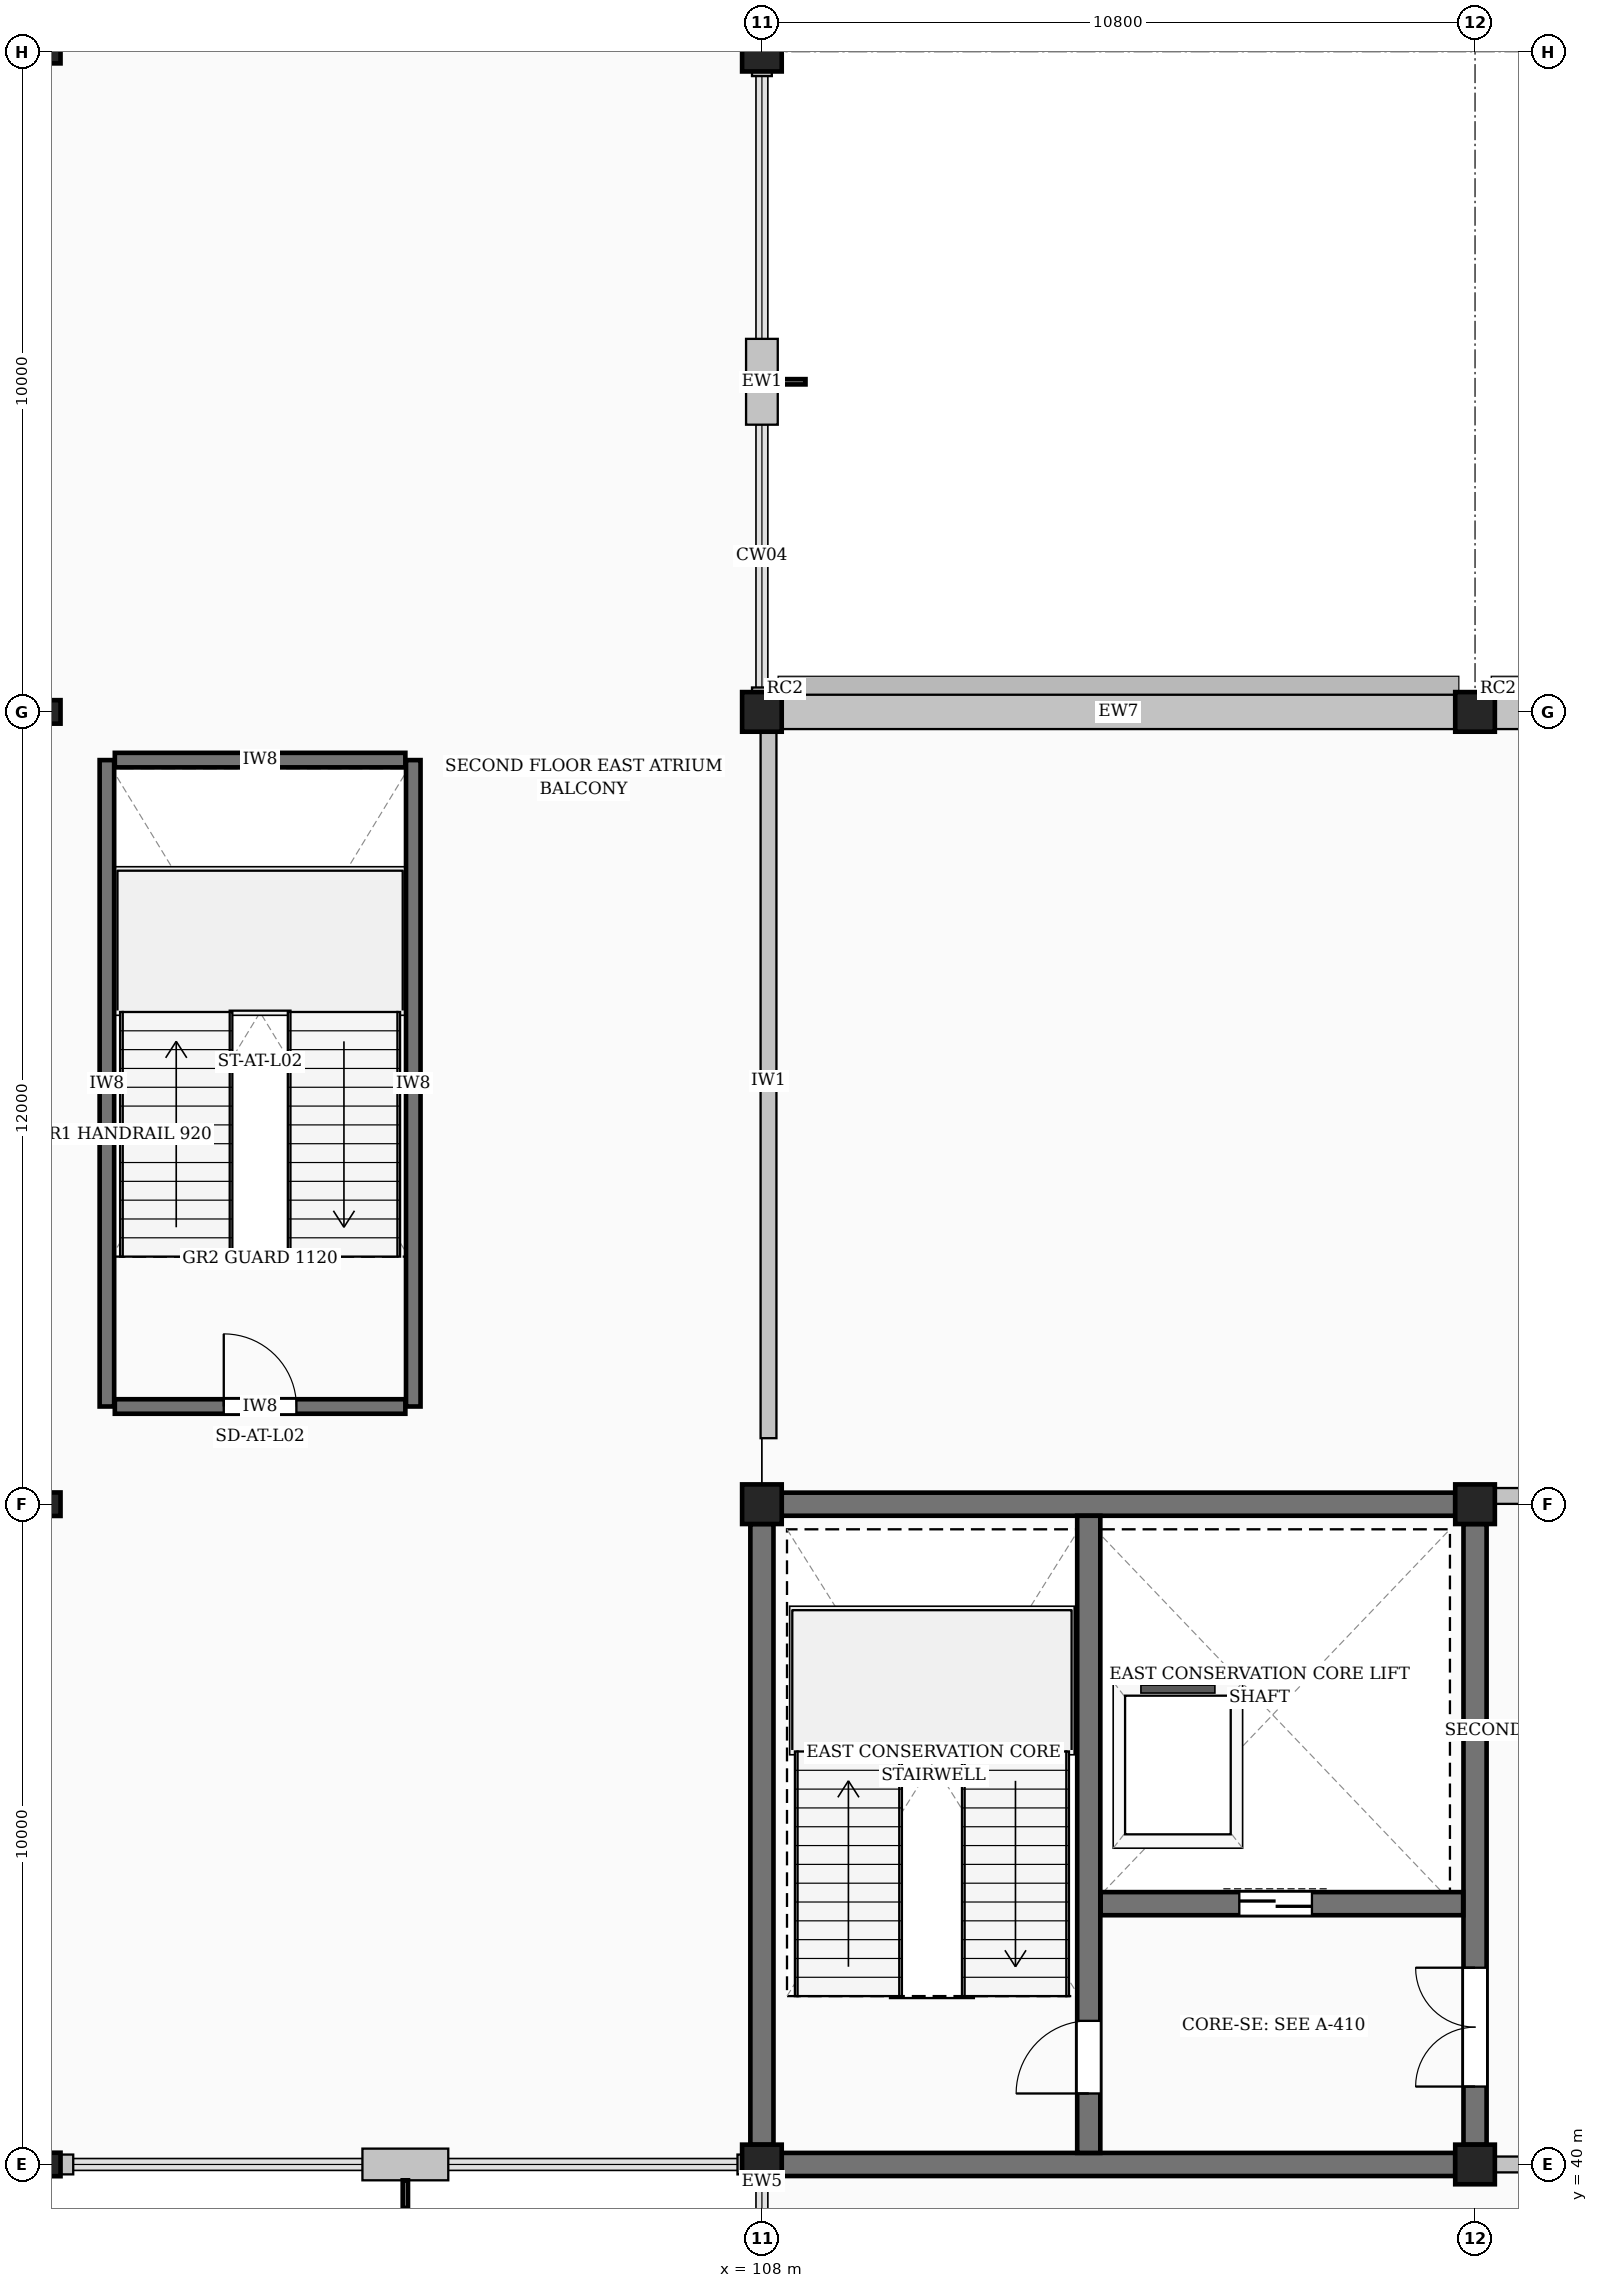
"""IFC4 building model, lengths in metres.
Left out: names, types, materials, properties, quantities, classifications, styles, units other than length and angle.
Written with IfcOpenShell. Run it as: python <this file> out.ifc"""

import sys

from ifc_helpers import new_model, si_unit, direction, frame, frame_2d, origin, origin_2d, place, context, subcontext, project, spatial, rectangle, hollow_circle, extrude, element, fill, save


model = new_model("IFC4")
c1 = context("Model", 3, precision=1e-05, world=origin(), true_north=direction((0.0, 1.0)))
c2 = subcontext(c1, "Body", "Model", "MODEL_VIEW")
j1 = project(units=[si_unit("LENGTHUNIT", "METRE"), si_unit("PLANEANGLEUNIT", "RADIAN")], contexts=[c1])
p1 = place(None, origin())
s1 = spatial("IfcSite", under=j1, at=p1, CompositionType="ELEMENT")
p2 = place(p1, origin())
s2 = spatial("IfcBuilding", under=s1, at=p2, CompositionType="ELEMENT")
p3 = place(p2, frame((0.0, 0.0, 9.6)))
s3 = spatial("IfcBuildingStorey", under=s2, at=p3, CompositionType="ELEMENT", Elevation=9.6)
for number, where, z_axis, x_axis in (
    (1, (97.2, 40.0, 0.0), (0.0, 0.0, 1.0), (1.0, 0.0, 0.0)),
    (2, (97.2, 50.0, 0.0), (0.0, 0.0, 1.0), (1.0, 0.0, 0.0)),
    (3, (97.2, 62.0, 0.0), (0.0, 0.0, 1.0), (1.0, 0.0, 0.0)),
    (4, (97.2, 72.0, 0.0), (0.0, 0.0, 1.0), (1.0, 0.0, 0.0)),
):
    element("IfcColumn", number, at=place(p3, frame(where, z_axis=z_axis, x_axis=x_axis)), inside=s3, PredefinedType="COLUMN", context=c2, shape_type="SweptSolid", body=[
        extrude(hollow_circle(Radius=0.178, WallThickness=0.016, at=origin_2d()), origin(), (0.0, 0.0, 1.0), 4.8),
    ])
for number, where, z_axis, x_axis in (
    (5, (108.0, 40.0, 0.0), (0.0, 0.0, 1.0), (1.0, 0.0, 0.0)),
    (6, (108.0, 50.0, 0.0), (0.0, 0.0, 1.0), (1.0, 0.0, 0.0)),
    (7, (108.0, 62.0, 0.0), (0.0, 0.0, 1.0), (1.0, 0.0, 0.0)),
    (8, (108.0, 72.0, 0.0), (0.0, 0.0, 1.0), (1.0, 0.0, 0.0)),
    (9, (118.8, 40.0, 0.0), (0.0, 0.0, 1.0), (1.0, 0.0, 0.0)),
    (10, (118.8, 50.0, 0.0), (0.0, 0.0, 1.0), (1.0, 0.0, 0.0)),
    (11, (118.8, 62.0, 0.0), (0.0, 0.0, 1.0), (1.0, 0.0, 0.0)),
):
    element("IfcColumn", number, at=place(p3, frame(where, z_axis=z_axis, x_axis=x_axis)), inside=s3, PredefinedType="COLUMN", context=c2, shape_type="SweptSolid", body=[
        extrude(rectangle(XDim=0.6, YDim=0.6, at=origin_2d()), origin(), (0.0, 0.0, 1.0), 4.8),
    ])
p4 = place(p3, frame((108.0, 39.855, 0.0), z_axis=(0.0, 0.0, 1.0), x_axis=(0.0, -1.0, 0.0)))
e12 = element("IfcWall", 12, at=p4, inside=s3, PredefinedType="STANDARD", context=c2, shape_type="SweptSolid", body=[
    extrude(rectangle(XDim=0.225, YDim=0.3, at=frame_2d((0.113, 0.0))), origin(), (0.0, 0.0, 1.0), 4.56),
])
for number, where, z_axis, x_axis in (
    (13, (129.455, 62.0, 0.0), (0.0, 0.0, 1.0), (-1.0, 0.0, 0.0)),
    (14, (118.655, 62.0, 0.0), (0.0, 0.0, 1.0), (-1.0, 0.0, 0.0)),
):
    element("IfcWall", number, at=place(p3, frame(where, z_axis=z_axis, x_axis=x_axis)), inside=s3, PredefinedType="SOLIDWALL", context=c2, shape_type="SweptSolid", body=[
        extrude(rectangle(XDim=10.51, YDim=0.52, at=frame_2d((5.255, 0.0))), origin(), (0.0, 0.0, 1.0), 3.929),
    ])
p5 = place(p3, frame((108.0, 66.35, 0.0), z_axis=(0.0, 0.0, 1.0), x_axis=(0.0, 1.0, 0.0)))
e15 = element("IfcWall", 15, at=p5, inside=s3, PredefinedType="STANDARD", context=c2, shape_type="SweptSolid", body=[
    extrude(rectangle(XDim=1.3, YDim=0.48, at=frame_2d((0.65, 0.0))), origin(), (0.0, 0.0, 1.0), 4.56),
])
for number, where, z_axis, x_axis in (
    (16, (108.0, 62.145, 0.0), (0.0, 0.0, 1.0), (0.0, 1.0, 0.0)),
    (17, (108.0, 71.63, 0.0), (0.0, 0.0, 1.0), (0.0, 1.0, 0.0)),
):
    element("IfcWall", number, at=place(p3, frame(where, z_axis=z_axis, x_axis=x_axis)), inside=s3, PredefinedType="STANDARD", context=c2, shape_type="SweptSolid", body=[
        extrude(rectangle(XDim=0.225, YDim=0.3, at=frame_2d((0.113, 0.0))), origin(), (0.0, 0.0, 1.0), 4.56),
    ])
p6 = place(p3, frame((101.95, 40.0, 0.0), z_axis=(0.0, 0.0, 1.0), x_axis=(1.0, 0.0, 0.0)))
e18 = element("IfcWall", 18, at=p6, inside=s3, PredefinedType="STANDARD", context=c2, shape_type="SweptSolid", body=[
    extrude(rectangle(XDim=1.3, YDim=0.48, at=frame_2d((0.65, 0.0))), origin(), (0.0, 0.0, 1.0), 4.11),
])
for number, where, z_axis, x_axis in (
    (19, (97.345, 40.0, 0.0), (0.0, 0.0, 1.0), (1.0, 0.0, 0.0)),
    (20, (107.63, 40.0, 0.0), (0.0, 0.0, 1.0), (1.0, 0.0, 0.0)),
):
    element("IfcWall", number, at=place(p3, frame(where, z_axis=z_axis, x_axis=x_axis)), inside=s3, PredefinedType="STANDARD", context=c2, shape_type="SweptSolid", body=[
        extrude(rectangle(XDim=0.225, YDim=0.3, at=frame_2d((0.113, 0.0))), origin(), (0.0, 0.0, 1.0), 4.56),
    ])
for number, where, z_axis, x_axis in (
    (21, (108.3, 40.0, 0.0), (0.0, 0.0, 1.0), (1.0, 0.0, 0.0)),
    (22, (108.3, 50.0, 0.0), (0.0, 0.0, 1.0), (1.0, 0.0, 0.0)),
):
    element("IfcWall", number, at=place(p3, frame(where, z_axis=z_axis, x_axis=x_axis)), inside=s3, PredefinedType="SHEAR", context=c2, shape_type="SweptSolid", body=[
        extrude(rectangle(XDim=10.2, YDim=0.35, at=frame_2d((5.1, 0.0))), origin(), (0.0, 0.0, 1.0), 4.56),
    ])
p7 = place(p3, frame((108.0, 40.3, 0.0), z_axis=(0.0, 0.0, 1.0), x_axis=(0.0, 1.0, 0.0)))
e23 = element("IfcWall", 23, at=p7, inside=s3, PredefinedType="SHEAR", context=c2, shape_type="SweptSolid", body=[
    extrude(rectangle(XDim=9.4, YDim=0.35, at=frame_2d((4.7, 0.0))), origin(), (0.0, 0.0, 1.0), 4.56),
])
p8 = place(p3, frame((118.8, 40.3, 0.0), z_axis=(0.0, 0.0, 1.0), x_axis=(0.0, 1.0, 0.0)))
e24 = element("IfcWall", 24, at=p8, inside=s3, PredefinedType="SHEAR", context=c2, shape_type="SweptSolid", body=[
    extrude(rectangle(XDim=9.4, YDim=0.35, at=frame_2d((4.7, 0.0))), origin(), (0.0, 0.0, 1.0), 4.56),
])
p9 = place(p8, frame((0.88, 0.0, 0.0)))
e25 = element("IfcOpeningElement", 25, at=p9, cuts=e24, PredefinedType="OPENING", context=c2, shape_type="SweptSolid", body=[
    extrude(rectangle(XDim=1.8, YDim=2.25, at=frame_2d((0.9, 1.125))), frame((0.0, 0.185, 0.0), z_axis=(0.0, -1.0, 0.0), x_axis=(1.0, 0.0, 0.0)), (0.0, 0.0, 1.0), 0.37),
])
p10 = place(p3, frame((112.95, 40.175, 0.0), z_axis=(0.0, 0.0, 1.0), x_axis=(0.0, 1.0, 0.0)))
e26 = element("IfcWall", 26, at=p10, inside=s3, PredefinedType="SHEAR", context=c2, shape_type="SweptSolid", body=[
    extrude(rectangle(XDim=9.65, YDim=0.35, at=frame_2d((4.825, 0.0))), origin(), (0.0, 0.0, 1.0), 4.56),
])
p11 = place(p10, frame((0.9, 0.0, 0.0)))
e27 = element("IfcOpeningElement", 27, at=p11, cuts=e26, PredefinedType="OPENING", context=c2, shape_type="SweptSolid", body=[
    extrude(rectangle(XDim=1.1, YDim=2.2, at=frame_2d((0.55, 1.1))), frame((0.0, 0.185, 0.0), z_axis=(0.0, -1.0, 0.0), x_axis=(1.0, 0.0, 0.0)), (0.0, 0.0, 1.0), 0.37),
])
p12 = place(p3, frame((113.13, 43.95, 0.0), z_axis=(0.0, 0.0, 1.0), x_axis=(1.0, 0.0, 0.0)))
e28 = element("IfcWall", 28, at=p12, inside=s3, PredefinedType="SHEAR", context=c2, shape_type="SweptSolid", body=[
    extrude(rectangle(XDim=5.49, YDim=0.35, at=frame_2d((2.745, 0.0))), origin(), (0.0, 0.0, 1.0), 4.56),
])
p13 = place(p12, frame((2.1, 0.0, 0.0)))
e29 = element("IfcOpeningElement", 29, at=p13, cuts=e28, PredefinedType="OPENING", context=c2, shape_type="SweptSolid", body=[
    extrude(rectangle(XDim=1.1, YDim=2.2, at=frame_2d((0.55, 1.1))), frame((0.0, 0.185, 0.0), z_axis=(0.0, -1.0, 0.0), x_axis=(1.0, 0.0, 0.0)), (0.0, 0.0, 1.0), 0.37),
])
for number, where, z_axis, x_axis in (
    (30, (98.08, 51.48, 0.0), (0.0, 0.0, 1.0), (0.0, 1.0, 0.0)),
    (31, (102.72, 51.48, 0.0), (0.0, 0.0, 1.0), (0.0, 1.0, 0.0)),
):
    element("IfcWall", number, at=place(p3, frame(where, z_axis=z_axis, x_axis=x_axis)), inside=s3, PredefinedType="SHEAR", context=c2, shape_type="SweptSolid", body=[
        extrude(rectangle(XDim=9.79, YDim=0.22, at=frame_2d((4.895, 0.0))), origin(), (0.0, 0.0, 1.0), 4.56),
    ])
p14 = place(p3, frame((98.2, 61.27, 0.0), z_axis=(0.0, 0.0, 1.0), x_axis=(1.0, 0.0, 0.0)))
e32 = element("IfcWall", 32, at=p14, inside=s3, PredefinedType="SHEAR", context=c2, shape_type="SweptSolid", body=[
    extrude(rectangle(XDim=4.4, YDim=0.22, at=frame_2d((2.2, 0.0))), origin(), (0.0, 0.0, 1.0), 4.56),
])
p15 = place(p3, frame((98.2, 51.48, 0.0), z_axis=(0.0, 0.0, 1.0), x_axis=(1.0, 0.0, 0.0)))
e33 = element("IfcWall", 33, at=p15, inside=s3, PredefinedType="SHEAR", context=c2, shape_type="SweptSolid", body=[
    extrude(rectangle(XDim=4.4, YDim=0.22, at=frame_2d((2.2, 0.0))), origin(), (0.0, 0.0, 1.0), 4.56),
])
p16 = place(p15, frame((1.65, 0.0, 0.0)))
e34 = element("IfcOpeningElement", 34, at=p16, cuts=e33, PredefinedType="OPENING", context=c2, shape_type="SweptSolid", body=[
    extrude(rectangle(XDim=1.1, YDim=2.2, at=frame_2d((0.55, 1.1))), frame((0.0, 0.12, 0.0), z_axis=(0.0, -1.0, 0.0), x_axis=(1.0, 0.0, 0.0)), (0.0, 0.0, 1.0), 0.24),
])
p17 = place(p3, frame((118.98, 40.0, 0.0), z_axis=(0.0, 0.0, 1.0), x_axis=(1.0, 0.0, 0.0)))
e35 = element("IfcWall", 35, at=p17, inside=s3, PredefinedType="SOLIDWALL", context=c2, shape_type="SweptSolid", body=[
    extrude(rectangle(XDim=10.42, YDim=0.24, at=frame_2d((5.21, 0.0))), origin(), (0.0, 0.0, 1.0), 3.929),
])
p18 = place(p17, frame((4.42, 0.0, 0.0)))
e36 = element("IfcOpeningElement", 36, at=p18, cuts=e35, PredefinedType="OPENING", context=c2, shape_type="SweptSolid", body=[
    extrude(rectangle(XDim=1.58, YDim=2.48, at=frame_2d((0.79, 1.24))), frame((0.0, 0.13, 0.0), z_axis=(0.0, -1.0, 0.0), x_axis=(1.0, 0.0, 0.0)), (0.0, 0.0, 1.0), 0.26),
])
p19 = place(p3, frame((118.98, 50.125, 0.0), z_axis=(0.0, 0.0, 1.0), x_axis=(1.0, 0.0, 0.0)))
e37 = element("IfcWall", 37, at=p19, inside=s3, PredefinedType="SOLIDWALL", context=c2, shape_type="SweptSolid", body=[
    extrude(rectangle(XDim=6.62, YDim=0.24, at=frame_2d((3.31, 0.0))), origin(), (0.0, 0.0, 1.0), 3.929),
])
p20 = place(p19, frame((2.21, 0.0, 0.0)))
e38 = element("IfcOpeningElement", 38, at=p20, cuts=e37, PredefinedType="OPENING", context=c2, shape_type="SweptSolid", body=[
    extrude(rectangle(XDim=2.2, YDim=2.6, at=frame_2d((1.1, 1.3))), frame((0.0, 0.13, 0.0), z_axis=(0.0, -1.0, 0.0), x_axis=(1.0, 0.0, 0.0)), (0.0, 0.0, 1.0), 0.26),
])
p21 = place(p3, frame((108.1, 51.0, 0.0), z_axis=(0.0, 0.0, 1.0), x_axis=(0.0, 1.0, 0.0)))
e39 = element("IfcWall", 39, at=p21, inside=s3, PredefinedType="SOLIDWALL", context=c2, shape_type="SweptSolid", body=[
    extrude(rectangle(XDim=10.82, YDim=0.24, at=frame_2d((5.41, 0.0))), origin(), (0.0, 0.0, 1.0), 3.92),
])
p22 = place(p11, origin())
e40 = element("IfcDoor", 40, at=p22, inside=s3, OperationType="SINGLE_SWING_LEFT", PredefinedType="DOOR", context=c2, shape_type="SweptSolid", body=[
    extrude(rectangle(XDim=1.1, YDim=2.2, at=frame_2d((0.55, 1.1))), frame((0.0, 0.025, 0.0), z_axis=(0.0, -1.0, 0.0), x_axis=(1.0, 0.0, 0.0)), (0.0, 0.0, 1.0), 0.05),
])
fill(e27, e40)
p23 = place(p9, origin())
e41 = element("IfcDoor", 41, at=p23, inside=s3, OperationType="DOUBLE_DOOR_SINGLE_SWING", PredefinedType="DOOR", context=c2, shape_type="SweptSolid", body=[
    extrude(rectangle(XDim=1.8, YDim=2.25, at=frame_2d((0.9, 1.125))), frame((0.0, 0.025, 0.0), z_axis=(0.0, -1.0, 0.0), x_axis=(1.0, 0.0, 0.0)), (0.0, 0.0, 1.0), 0.05),
])
fill(e25, e41)
p24 = place(p13, origin())
e42 = element("IfcDoor", 42, at=p24, inside=s3, OperationType="DOUBLE_DOOR_SLIDING", PredefinedType="DOOR", context=c2, shape_type="SweptSolid", body=[
    extrude(rectangle(XDim=1.1, YDim=2.2, at=frame_2d((0.55, 1.1))), frame((0.0, 0.025, 0.0), z_axis=(0.0, -1.0, 0.0), x_axis=(1.0, 0.0, 0.0)), (0.0, 0.0, 1.0), 0.05),
])
fill(e29, e42)
p25 = place(p16, origin())
e43 = element("IfcDoor", 43, at=p25, inside=s3, OperationType="SINGLE_SWING_LEFT", PredefinedType="DOOR", context=c2, shape_type="SweptSolid", body=[
    extrude(rectangle(XDim=1.1, YDim=2.2, at=frame_2d((0.55, 1.1))), frame((0.0, 0.025, 0.0), z_axis=(0.0, -1.0, 0.0), x_axis=(1.0, 0.0, 0.0)), (0.0, 0.0, 1.0), 0.05),
])
fill(e34, e43)
save(model, sys.argv[1])
